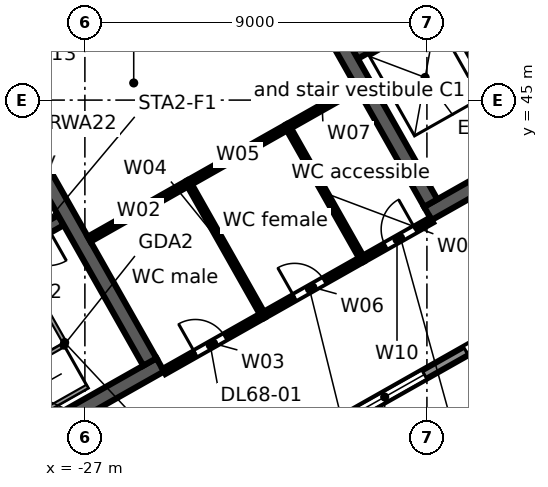
"""IFC4 building model, lengths in metres.
Left out: names, types, materials, properties, quantities, classifications, styles, units other than length and angle.
Written with IfcOpenShell. Run it as: python <this file> out.ifc"""

import sys

from ifc_helpers import new_model, si_unit, direction, frame, frame_2d, origin, place, context, subcontext, project, spatial, rectangle, extrude, element, fill, save


model = new_model("IFC4")
c1 = context("Model", 3, precision=1e-05, world=origin(), true_north=direction((0.0, 1.0)))
c2 = subcontext(c1, "Body", "Model", "MODEL_VIEW")
j1 = project(units=[si_unit("LENGTHUNIT", "METRE"), si_unit("PLANEANGLEUNIT", "RADIAN")], contexts=[c1])
p1 = place(None, origin())
s1 = spatial("IfcSite", under=j1, at=p1, CompositionType="ELEMENT")
p2 = place(p1, origin())
s2 = spatial("IfcBuilding", under=s1, at=p2, CompositionType="ELEMENT")
p3 = place(p2, frame((0.0, 0.0, 304.5)))
s3 = spatial("IfcBuildingStorey", under=s2, at=p3, CompositionType="ELEMENT", Elevation=304.5)
p4 = place(p3, frame((-58.732, 38.771, 0.0), z_axis=(0.0, 0.0, 1.0), x_axis=(0.870355615581, 0.492423702137, 0.0)))
e1 = element("IfcWall", 1, at=p4, inside=s3, PredefinedType="STANDARD", context=c2, shape_type="SweptSolid", body=[
    extrude(rectangle(XDim=64.052, YDim=0.25, at=frame_2d((32.026, 0.0))), origin(), (0.0, 0.0, 1.0), 3.52),
])
p5 = place(p4, frame((61.259, 0.0, 0.8)))
e2 = element("IfcOpeningElement", 2, at=p5, cuts=e1, PredefinedType="OPENING", context=c2, shape_type="SweptSolid", body=[
    extrude(rectangle(XDim=2.4, YDim=2.2, at=frame_2d((1.2, 1.1))), frame((0.0, 0.135, 0.0), z_axis=(0.0, -1.0, 0.0), x_axis=(1.0, 0.0, 0.0)), (0.0, 0.0, 1.0), 0.27),
])
p6 = place(p4, frame((58.216, 0.0, 0.8)))
e3 = element("IfcOpeningElement", 3, at=p6, cuts=e1, PredefinedType="OPENING", context=c2, shape_type="SweptSolid", body=[
    extrude(rectangle(XDim=2.4, YDim=2.2, at=frame_2d((1.2, 1.1))), frame((0.0, 0.135, 0.0), z_axis=(0.0, -1.0, 0.0), x_axis=(1.0, 0.0, 0.0)), (0.0, 0.0, 1.0), 0.27),
])
p7 = place(p4, frame((55.173, 0.0, 0.8)))
e4 = element("IfcOpeningElement", 4, at=p7, cuts=e1, PredefinedType="OPENING", context=c2, shape_type="SweptSolid", body=[
    extrude(rectangle(XDim=2.4, YDim=2.2, at=frame_2d((1.2, 1.1))), frame((0.0, 0.135, 0.0), z_axis=(0.0, -1.0, 0.0), x_axis=(1.0, 0.0, 0.0)), (0.0, 0.0, 1.0), 0.27),
])
p8 = place(p4, frame((52.129, 0.0, 0.8)))
e5 = element("IfcOpeningElement", 5, at=p8, cuts=e1, PredefinedType="OPENING", context=c2, shape_type="SweptSolid", body=[
    extrude(rectangle(XDim=2.4, YDim=2.2, at=frame_2d((1.2, 1.1))), frame((0.0, 0.135, 0.0), z_axis=(0.0, -1.0, 0.0), x_axis=(1.0, 0.0, 0.0)), (0.0, 0.0, 1.0), 0.27),
])
p9 = place(p4, frame((49.086, 0.0, 0.8)))
e6 = element("IfcOpeningElement", 6, at=p9, cuts=e1, PredefinedType="OPENING", context=c2, shape_type="SweptSolid", body=[
    extrude(rectangle(XDim=2.4, YDim=2.2, at=frame_2d((1.2, 1.1))), frame((0.0, 0.135, 0.0), z_axis=(0.0, -1.0, 0.0), x_axis=(1.0, 0.0, 0.0)), (0.0, 0.0, 1.0), 0.27),
])
p10 = place(p4, frame((46.043, 0.0, 0.8)))
e7 = element("IfcOpeningElement", 7, at=p10, cuts=e1, PredefinedType="OPENING", context=c2, shape_type="SweptSolid", body=[
    extrude(rectangle(XDim=2.4, YDim=2.2, at=frame_2d((1.2, 1.1))), frame((0.0, 0.135, 0.0), z_axis=(0.0, -1.0, 0.0), x_axis=(1.0, 0.0, 0.0)), (0.0, 0.0, 1.0), 0.27),
])
p11 = place(p4, frame((43.0, 0.0, 0.8)))
e8 = element("IfcOpeningElement", 8, at=p11, cuts=e1, PredefinedType="OPENING", context=c2, shape_type="SweptSolid", body=[
    extrude(rectangle(XDim=2.4, YDim=2.2, at=frame_2d((1.2, 1.1))), frame((0.0, 0.135, 0.0), z_axis=(0.0, -1.0, 0.0), x_axis=(1.0, 0.0, 0.0)), (0.0, 0.0, 1.0), 0.27),
])
p12 = place(p4, frame((39.956, 0.0, 0.8)))
e9 = element("IfcOpeningElement", 9, at=p12, cuts=e1, PredefinedType="OPENING", context=c2, shape_type="SweptSolid", body=[
    extrude(rectangle(XDim=2.4, YDim=2.2, at=frame_2d((1.2, 1.1))), frame((0.0, 0.135, 0.0), z_axis=(0.0, -1.0, 0.0), x_axis=(1.0, 0.0, 0.0)), (0.0, 0.0, 1.0), 0.27),
])
p13 = place(p4, frame((36.913, 0.0, 0.8)))
e10 = element("IfcOpeningElement", 10, at=p13, cuts=e1, PredefinedType="OPENING", context=c2, shape_type="SweptSolid", body=[
    extrude(rectangle(XDim=2.4, YDim=2.2, at=frame_2d((1.2, 1.1))), frame((0.0, 0.135, 0.0), z_axis=(0.0, -1.0, 0.0), x_axis=(1.0, 0.0, 0.0)), (0.0, 0.0, 1.0), 0.27),
])
p14 = place(p4, frame((33.87, 0.0, 0.8)))
e11 = element("IfcOpeningElement", 11, at=p14, cuts=e1, PredefinedType="OPENING", context=c2, shape_type="SweptSolid", body=[
    extrude(rectangle(XDim=2.4, YDim=2.2, at=frame_2d((1.2, 1.1))), frame((0.0, 0.135, 0.0), z_axis=(0.0, -1.0, 0.0), x_axis=(1.0, 0.0, 0.0)), (0.0, 0.0, 1.0), 0.27),
])
p15 = place(p4, frame((30.826, 0.0, 0.8)))
e12 = element("IfcOpeningElement", 12, at=p15, cuts=e1, PredefinedType="OPENING", context=c2, shape_type="SweptSolid", body=[
    extrude(rectangle(XDim=2.4, YDim=2.2, at=frame_2d((1.2, 1.1))), frame((0.0, 0.135, 0.0), z_axis=(0.0, -1.0, 0.0), x_axis=(1.0, 0.0, 0.0)), (0.0, 0.0, 1.0), 0.27),
])
p16 = place(p4, frame((27.783, 0.0, 0.8)))
e13 = element("IfcOpeningElement", 13, at=p16, cuts=e1, PredefinedType="OPENING", context=c2, shape_type="SweptSolid", body=[
    extrude(rectangle(XDim=2.4, YDim=2.2, at=frame_2d((1.2, 1.1))), frame((0.0, 0.135, 0.0), z_axis=(0.0, -1.0, 0.0), x_axis=(1.0, 0.0, 0.0)), (0.0, 0.0, 1.0), 0.27),
])
p17 = place(p4, frame((24.74, 0.0, 0.8)))
e14 = element("IfcOpeningElement", 14, at=p17, cuts=e1, PredefinedType="OPENING", context=c2, shape_type="SweptSolid", body=[
    extrude(rectangle(XDim=2.4, YDim=2.2, at=frame_2d((1.2, 1.1))), frame((0.0, 0.135, 0.0), z_axis=(0.0, -1.0, 0.0), x_axis=(1.0, 0.0, 0.0)), (0.0, 0.0, 1.0), 0.27),
])
p18 = place(p4, frame((21.696, 0.0, 0.8)))
e15 = element("IfcOpeningElement", 15, at=p18, cuts=e1, PredefinedType="OPENING", context=c2, shape_type="SweptSolid", body=[
    extrude(rectangle(XDim=2.4, YDim=2.2, at=frame_2d((1.2, 1.1))), frame((0.0, 0.135, 0.0), z_axis=(0.0, -1.0, 0.0), x_axis=(1.0, 0.0, 0.0)), (0.0, 0.0, 1.0), 0.27),
])
p19 = place(p4, frame((18.653, 0.0, 0.8)))
e16 = element("IfcOpeningElement", 16, at=p19, cuts=e1, PredefinedType="OPENING", context=c2, shape_type="SweptSolid", body=[
    extrude(rectangle(XDim=2.4, YDim=2.2, at=frame_2d((1.2, 1.1))), frame((0.0, 0.135, 0.0), z_axis=(0.0, -1.0, 0.0), x_axis=(1.0, 0.0, 0.0)), (0.0, 0.0, 1.0), 0.27),
])
p20 = place(p4, frame((15.61, 0.0, 0.8)))
e17 = element("IfcOpeningElement", 17, at=p20, cuts=e1, PredefinedType="OPENING", context=c2, shape_type="SweptSolid", body=[
    extrude(rectangle(XDim=2.4, YDim=2.2, at=frame_2d((1.2, 1.1))), frame((0.0, 0.135, 0.0), z_axis=(0.0, -1.0, 0.0), x_axis=(1.0, 0.0, 0.0)), (0.0, 0.0, 1.0), 0.27),
])
p21 = place(p4, frame((12.567, 0.0, 0.8)))
e18 = element("IfcOpeningElement", 18, at=p21, cuts=e1, PredefinedType="OPENING", context=c2, shape_type="SweptSolid", body=[
    extrude(rectangle(XDim=2.4, YDim=2.2, at=frame_2d((1.2, 1.1))), frame((0.0, 0.135, 0.0), z_axis=(0.0, -1.0, 0.0), x_axis=(1.0, 0.0, 0.0)), (0.0, 0.0, 1.0), 0.27),
])
p22 = place(p4, frame((9.523, 0.0, 0.8)))
e19 = element("IfcOpeningElement", 19, at=p22, cuts=e1, PredefinedType="OPENING", context=c2, shape_type="SweptSolid", body=[
    extrude(rectangle(XDim=2.4, YDim=2.2, at=frame_2d((1.2, 1.1))), frame((0.0, 0.135, 0.0), z_axis=(0.0, -1.0, 0.0), x_axis=(1.0, 0.0, 0.0)), (0.0, 0.0, 1.0), 0.27),
])
p23 = place(p4, frame((6.48, 0.0, 0.8)))
e20 = element("IfcOpeningElement", 20, at=p23, cuts=e1, PredefinedType="OPENING", context=c2, shape_type="SweptSolid", body=[
    extrude(rectangle(XDim=2.4, YDim=2.2, at=frame_2d((1.2, 1.1))), frame((0.0, 0.135, 0.0), z_axis=(0.0, -1.0, 0.0), x_axis=(1.0, 0.0, 0.0)), (0.0, 0.0, 1.0), 0.27),
])
p24 = place(p4, frame((3.437, 0.0, 0.8)))
e21 = element("IfcOpeningElement", 21, at=p24, cuts=e1, PredefinedType="OPENING", context=c2, shape_type="SweptSolid", body=[
    extrude(rectangle(XDim=2.4, YDim=2.2, at=frame_2d((1.2, 1.1))), frame((0.0, 0.135, 0.0), z_axis=(0.0, -1.0, 0.0), x_axis=(1.0, 0.0, 0.0)), (0.0, 0.0, 1.0), 0.27),
])
p25 = place(p4, frame((0.393, 0.0, 0.8)))
e22 = element("IfcOpeningElement", 22, at=p25, cuts=e1, PredefinedType="OPENING", context=c2, shape_type="SweptSolid", body=[
    extrude(rectangle(XDim=2.4, YDim=2.2, at=frame_2d((1.2, 1.1))), frame((0.0, 0.135, 0.0), z_axis=(0.0, -1.0, 0.0), x_axis=(1.0, 0.0, 0.0)), (0.0, 0.0, 1.0), 0.27),
])
p26 = place(p3, frame((-3.017, 46.293, 0.0), z_axis=(0.0, 0.0, 1.0), x_axis=(-0.870355474887, -0.492423950812, 0.0)))
e23 = element("IfcWall", 23, at=p26, inside=s3, PredefinedType="STANDARD", context=c2, shape_type="SweptSolid", body=[
    extrude(rectangle(XDim=40.34, YDim=0.25, at=frame_2d((20.17, 0.0))), origin(), (0.0, 0.0, 1.0), 3.52),
])
p27 = place(p26, frame((37.428, 0.0, 0.8)))
e24 = element("IfcOpeningElement", 24, at=p27, cuts=e23, PredefinedType="OPENING", context=c2, shape_type="SweptSolid", body=[
    extrude(rectangle(XDim=2.4, YDim=2.2, at=frame_2d((1.2, 1.1))), frame((0.0, 0.135, 0.0), z_axis=(0.0, -1.0, 0.0), x_axis=(1.0, 0.0, 0.0)), (0.0, 0.0, 1.0), 0.27),
])
p28 = place(p26, frame((34.372, 0.0, 0.0)))
e25 = element("IfcOpeningElement", 25, at=p28, cuts=e23, PredefinedType="OPENING", context=c2, shape_type="SweptSolid", body=[
    extrude(rectangle(XDim=1.8, YDim=2.4, at=frame_2d((0.9, 1.2))), frame((0.0, 0.135, 0.0), z_axis=(0.0, -1.0, 0.0), x_axis=(1.0, 0.0, 0.0)), (0.0, 0.0, 1.0), 0.27),
])
p29 = place(p26, frame((30.716, 0.0, 0.8)))
e26 = element("IfcOpeningElement", 26, at=p29, cuts=e23, PredefinedType="OPENING", context=c2, shape_type="SweptSolid", body=[
    extrude(rectangle(XDim=2.4, YDim=2.2, at=frame_2d((1.2, 1.1))), frame((0.0, 0.135, 0.0), z_axis=(0.0, -1.0, 0.0), x_axis=(1.0, 0.0, 0.0)), (0.0, 0.0, 1.0), 0.27),
])
p30 = place(p26, frame((27.36, 0.0, 0.8)))
e27 = element("IfcOpeningElement", 27, at=p30, cuts=e23, PredefinedType="OPENING", context=c2, shape_type="SweptSolid", body=[
    extrude(rectangle(XDim=2.4, YDim=2.2, at=frame_2d((1.2, 1.1))), frame((0.0, 0.135, 0.0), z_axis=(0.0, -1.0, 0.0), x_axis=(1.0, 0.0, 0.0)), (0.0, 0.0, 1.0), 0.27),
])
p31 = place(p26, frame((24.304, 0.0, 0.0)))
e28 = element("IfcOpeningElement", 28, at=p31, cuts=e23, PredefinedType="OPENING", context=c2, shape_type="SweptSolid", body=[
    extrude(rectangle(XDim=1.8, YDim=2.4, at=frame_2d((0.9, 1.2))), frame((0.0, 0.135, 0.0), z_axis=(0.0, -1.0, 0.0), x_axis=(1.0, 0.0, 0.0)), (0.0, 0.0, 1.0), 0.27),
])
p32 = place(p26, frame((20.648, 0.0, 0.8)))
e29 = element("IfcOpeningElement", 29, at=p32, cuts=e23, PredefinedType="OPENING", context=c2, shape_type="SweptSolid", body=[
    extrude(rectangle(XDim=2.4, YDim=2.2, at=frame_2d((1.2, 1.1))), frame((0.0, 0.135, 0.0), z_axis=(0.0, -1.0, 0.0), x_axis=(1.0, 0.0, 0.0)), (0.0, 0.0, 1.0), 0.27),
])
p33 = place(p26, frame((17.292, 0.0, 0.8)))
e30 = element("IfcOpeningElement", 30, at=p33, cuts=e23, PredefinedType="OPENING", context=c2, shape_type="SweptSolid", body=[
    extrude(rectangle(XDim=2.4, YDim=2.2, at=frame_2d((1.2, 1.1))), frame((0.0, 0.135, 0.0), z_axis=(0.0, -1.0, 0.0), x_axis=(1.0, 0.0, 0.0)), (0.0, 0.0, 1.0), 0.27),
])
p34 = place(p26, frame((14.236, 0.0, 0.0)))
e31 = element("IfcOpeningElement", 31, at=p34, cuts=e23, PredefinedType="OPENING", context=c2, shape_type="SweptSolid", body=[
    extrude(rectangle(XDim=1.8, YDim=2.4, at=frame_2d((0.9, 1.2))), frame((0.0, 0.135, 0.0), z_axis=(0.0, -1.0, 0.0), x_axis=(1.0, 0.0, 0.0)), (0.0, 0.0, 1.0), 0.27),
])
p35 = place(p26, frame((10.58, 0.0, 0.8)))
e32 = element("IfcOpeningElement", 32, at=p35, cuts=e23, PredefinedType="OPENING", context=c2, shape_type="SweptSolid", body=[
    extrude(rectangle(XDim=2.4, YDim=2.2, at=frame_2d((1.2, 1.1))), frame((0.0, 0.135, 0.0), z_axis=(0.0, -1.0, 0.0), x_axis=(1.0, 0.0, 0.0)), (0.0, 0.0, 1.0), 0.27),
])
p36 = place(p26, frame((7.224, 0.0, 0.8)))
e33 = element("IfcOpeningElement", 33, at=p36, cuts=e23, PredefinedType="OPENING", context=c2, shape_type="SweptSolid", body=[
    extrude(rectangle(XDim=2.4, YDim=2.2, at=frame_2d((1.2, 1.1))), frame((0.0, 0.135, 0.0), z_axis=(0.0, -1.0, 0.0), x_axis=(1.0, 0.0, 0.0)), (0.0, 0.0, 1.0), 0.27),
])
p37 = place(p26, frame((4.168, 0.0, 0.0)))
e34 = element("IfcOpeningElement", 34, at=p37, cuts=e23, PredefinedType="OPENING", context=c2, shape_type="SweptSolid", body=[
    extrude(rectangle(XDim=1.8, YDim=2.4, at=frame_2d((0.9, 1.2))), frame((0.0, 0.135, 0.0), z_axis=(0.0, -1.0, 0.0), x_axis=(1.0, 0.0, 0.0)), (0.0, 0.0, 1.0), 0.27),
])
p38 = place(p26, frame((0.512, 0.0, 0.8)))
e35 = element("IfcOpeningElement", 35, at=p38, cuts=e23, PredefinedType="OPENING", context=c2, shape_type="SweptSolid", body=[
    extrude(rectangle(XDim=2.4, YDim=2.2, at=frame_2d((1.2, 1.1))), frame((0.0, 0.135, 0.0), z_axis=(0.0, -1.0, 0.0), x_axis=(1.0, 0.0, 0.0)), (0.0, 0.0, 1.0), 0.27),
])
p39 = place(p3, frame((-39.813, 29.662, 0.0), z_axis=(0.0, 0.0, 1.0), x_axis=(0.870350116061, 0.492433422375, 0.0)))
e36 = element("IfcWall", 36, at=p39, inside=s3, PredefinedType="SOLIDWALL", context=c2, shape_type="SweptSolid", body=[
    extrude(rectangle(XDim=17.0, YDim=0.4, at=frame_2d((8.5, 0.0))), origin(), (0.0, 0.0, 1.0), 3.52),
])
p40 = place(p39, frame((7.2, 0.0, 0.0)))
e37 = element("IfcOpeningElement", 37, at=p40, cuts=e36, PredefinedType="OPENING", context=c2, shape_type="SweptSolid", body=[
    extrude(rectangle(XDim=1.2, YDim=2.1, at=frame_2d((0.6, 1.05))), frame((0.0, 0.21, 0.0), z_axis=(0.0, -1.0, 0.0), x_axis=(1.0, 0.0, 0.0)), (0.0, 0.0, 1.0), 0.42),
])
p41 = place(p3, frame((-34.245, 38.097, 0.0), z_axis=(0.0, 0.0, 1.0), x_axis=(0.870356351998, 0.492422400523, 0.0)))
e38 = element("IfcWall", 38, at=p41, inside=s3, PredefinedType="SOLIDWALL", context=c2, shape_type="SweptSolid", body=[
    extrude(rectangle(XDim=7.6, YDim=0.3, at=frame_2d((3.8, 0.0))), origin(), (0.0, 0.0, 1.0), 3.52),
])
p42 = place(p41, frame((6.2, 0.0, 0.0)))
e39 = element("IfcOpeningElement", 39, at=p42, cuts=e38, PredefinedType="OPENING", context=c2, shape_type="SweptSolid", body=[
    extrude(rectangle(XDim=1.0, YDim=2.1, at=frame_2d((0.5, 1.05))), frame((0.0, 0.16, 0.0), z_axis=(0.0, -1.0, 0.0), x_axis=(1.0, 0.0, 0.0)), (0.0, 0.0, 1.0), 0.32),
])
p43 = place(p3, frame((-31.79, 49.597, 0.0), z_axis=(0.0, 0.0, 1.0), x_axis=(0.492421663121, -0.870356769198, 0.0)))
e40 = element("IfcWall", 40, at=p43, inside=s3, PredefinedType="SOLIDWALL", context=c2, shape_type="SweptSolid", body=[
    extrude(rectangle(XDim=13.2, YDim=0.4, at=frame_2d((6.6, 0.0))), origin(), (0.0, 0.0, 1.0), 3.52),
])
p44 = place(p3, frame((-17.975, 42.017, 0.0), z_axis=(0.0, 0.0, 1.0), x_axis=(0.87034965173, 0.492434243055, 0.0)))
e41 = element("IfcWall", 41, at=p44, inside=s3, PredefinedType="SOLIDWALL", context=c2, shape_type="SweptSolid", body=[
    extrude(rectangle(XDim=15.0, YDim=0.4, at=frame_2d((7.5, 0.0))), origin(), (0.0, 0.0, 1.0), 3.52),
])
p45 = place(p44, frame((6.1, 0.0, 0.0)))
e42 = element("IfcOpeningElement", 42, at=p45, cuts=e41, PredefinedType="OPENING", context=c2, shape_type="SweptSolid", body=[
    extrude(rectangle(XDim=1.2, YDim=2.1, at=frame_2d((0.6, 1.05))), frame((0.0, 0.21, 0.0), z_axis=(0.0, -1.0, 0.0), x_axis=(1.0, 0.0, 0.0)), (0.0, 0.0, 1.0), 0.42),
])
p46 = place(p3, frame((-19.892, 46.218, 0.0), z_axis=(0.0, 0.0, 1.0), x_axis=(0.870341639186, 0.492448404505, 0.0)))
e43 = element("IfcWall", 43, at=p46, inside=s3, PredefinedType="SOLIDWALL", context=c2, shape_type="SweptSolid", body=[
    extrude(rectangle(XDim=5.1, YDim=0.3, at=frame_2d((2.55, 0.0))), origin(), (0.0, 0.0, 1.0), 3.52),
])
p47 = place(p46, frame((0.75, 0.0, 0.0)))
e44 = element("IfcOpeningElement", 44, at=p47, cuts=e43, PredefinedType="OPENING", context=c2, shape_type="SweptSolid", body=[
    extrude(rectangle(XDim=1.1, YDim=2.1, at=frame_2d((0.55, 1.05))), frame((0.0, 0.16, 0.0), z_axis=(0.0, -1.0, 0.0), x_axis=(1.0, 0.0, 0.0)), (0.0, 0.0, 1.0), 0.32),
])
p48 = place(p46, frame((3.35, 0.0, 0.0)))
e45 = element("IfcOpeningElement", 45, at=p48, cuts=e43, PredefinedType="OPENING", context=c2, shape_type="SweptSolid", body=[
    extrude(rectangle(XDim=1.1, YDim=2.1, at=frame_2d((0.55, 1.05))), frame((0.0, 0.16, 0.0), z_axis=(0.0, -1.0, 0.0), x_axis=(1.0, 0.0, 0.0)), (0.0, 0.0, 1.0), 0.32),
])
p49 = place(p3, frame((-24.4, 53.779, 0.0), z_axis=(0.0, 0.0, 1.0), x_axis=(0.492421663121, -0.870356769198, 0.0)))
e46 = element("IfcWall", 46, at=p49, inside=s3, PredefinedType="SOLIDWALL", context=c2, shape_type="SweptSolid", body=[
    extrude(rectangle(XDim=13.2, YDim=0.4, at=frame_2d((6.6, 0.0))), origin(), (0.0, 0.0, 1.0), 3.52),
])
p50 = place(p3, frame((-17.469, 47.417, 0.0), z_axis=(0.0, 0.0, 1.0), x_axis=(0.492466057713, -0.870331650579, 0.0)))
e47 = element("IfcWall", 47, at=p50, inside=s3, PredefinedType="SOLIDWALL", context=c2, shape_type="SweptSolid", body=[
    extrude(rectangle(XDim=4.25, YDim=0.2, at=frame_2d((2.125, 0.0))), origin(), (0.0, 0.0, 1.0), 3.52),
])
p51 = place(p3, frame((-26.888, 41.34, 0.0), z_axis=(0.0, 0.0, 1.0), x_axis=(0.8702292093, 0.492647057518, 0.0)))
e48 = element("IfcWall", 48, at=p51, inside=s3, PredefinedType="PARTITIONING", context=c2, shape_type="SweptSolid", body=[
    extrude(rectangle(XDim=3.0, YDim=0.15, at=frame_2d((1.5, 0.0))), origin(), (0.0, 0.0, 1.0), 2.792),
])
p52 = place(p3, frame((-24.919, 37.859, 0.0), z_axis=(0.0, 0.0, 1.0), x_axis=(0.870368744559, 0.492400496034, 0.0)))
e49 = element("IfcWall", 49, at=p52, inside=s3, PredefinedType="PARTITIONING", context=c2, shape_type="SweptSolid", body=[
    extrude(rectangle(XDim=3.0, YDim=0.15, at=frame_2d((1.5, 0.0))), origin(), (0.0, 0.0, 1.0), 2.792),
])
p53 = place(p52, frame((0.95, 0.0, 0.0)))
e50 = element("IfcOpeningElement", 50, at=p53, cuts=e49, PredefinedType="OPENING", context=c2, shape_type="SweptSolid", body=[
    extrude(rectangle(XDim=0.9, YDim=2.1, at=frame_2d((0.45, 1.05))), frame((0.0, 0.085, 0.0), z_axis=(0.0, -1.0, 0.0), x_axis=(1.0, 0.0, 0.0)), (0.0, 0.0, 1.0), 0.17),
])
p54 = place(p3, frame((-24.277, 42.818, 0.0), z_axis=(0.0, 0.0, 1.0), x_axis=(0.492210087366, -0.870476438449, 0.0)))
e51 = element("IfcWall", 51, at=p54, inside=s3, PredefinedType="PARTITIONING", context=c2, shape_type="SweptSolid", body=[
    extrude(rectangle(XDim=4.0, YDim=0.125, at=frame_2d((2.0, 0.0))), origin(), (0.0, 0.0, 1.0), 3.52),
])
p55 = place(p3, frame((-24.277, 42.818, 0.0), z_axis=(0.0, 0.0, 1.0), x_axis=(0.870423351516, 0.492303960105, 0.0)))
e52 = element("IfcWall", 52, at=p55, inside=s3, PredefinedType="PARTITIONING", context=c2, shape_type="SweptSolid", body=[
    extrude(rectangle(XDim=3.0, YDim=0.15, at=frame_2d((1.5, 0.0))), origin(), (0.0, 0.0, 1.0), 3.52),
])
p56 = place(p3, frame((-22.308, 39.336, 0.0), z_axis=(0.0, 0.0, 1.0), x_axis=(0.870248957119, 0.492612172641, 0.0)))
e53 = element("IfcWall", 53, at=p56, inside=s3, PredefinedType="PARTITIONING", context=c2, shape_type="SweptSolid", body=[
    extrude(rectangle(XDim=3.0, YDim=0.15, at=frame_2d((1.5, 0.0))), origin(), (0.0, 0.0, 1.0), 3.52),
])
p57 = place(p56, frame((0.95, 0.0, 0.0)))
e54 = element("IfcOpeningElement", 54, at=p57, cuts=e53, PredefinedType="OPENING", context=c2, shape_type="SweptSolid", body=[
    extrude(rectangle(XDim=0.9, YDim=2.1, at=frame_2d((0.45, 1.05))), frame((0.0, 0.085, 0.0), z_axis=(0.0, -1.0, 0.0), x_axis=(1.0, 0.0, 0.0)), (0.0, 0.0, 1.0), 0.17),
])
p58 = place(p3, frame((-21.666, 44.295, 0.0), z_axis=(0.0, 0.0, 1.0), x_axis=(0.870297454631, 0.492526487067, 0.0)))
e55 = element("IfcWall", 55, at=p58, inside=s3, PredefinedType="PARTITIONING", context=c2, shape_type="SweptSolid", body=[
    extrude(rectangle(XDim=2.091, YDim=0.15, at=frame_2d((1.046, 0.0))), origin(), (0.0, 0.0, 1.0), 3.52),
])
p59 = place(p3, frame((-21.666, 44.295, 0.0), z_axis=(0.0, 0.0, 1.0), x_axis=(0.492340861121, -0.870402479587, 0.0)))
e56 = element("IfcWall", 56, at=p59, inside=s3, PredefinedType="PARTITIONING", context=c2, shape_type="SweptSolid", body=[
    extrude(rectangle(XDim=3.999, YDim=0.125, at=frame_2d((2.0, 0.0))), origin(), (0.0, 0.0, 1.0), 3.52),
])
p60 = place(p3, frame((-19.697, 40.814, 0.0), z_axis=(0.0, 0.0, 1.0), x_axis=(0.870497588791, 0.492172680986, 0.0)))
e57 = element("IfcWall", 57, at=p60, inside=s3, PredefinedType="PARTITIONING", context=c2, shape_type="SweptSolid", body=[
    extrude(rectangle(XDim=2.091, YDim=0.15, at=frame_2d((1.045, 0.0))), origin(), (0.0, 0.0, 1.0), 3.52),
])
p61 = place(p60, frame((0.7, 0.0, 0.0)))
e58 = element("IfcOpeningElement", 58, at=p61, cuts=e57, PredefinedType="OPENING", context=c2, shape_type="SweptSolid", body=[
    extrude(rectangle(XDim=0.9, YDim=2.1, at=frame_2d((0.45, 1.05))), frame((0.0, 0.085, 0.0), z_axis=(0.0, -1.0, 0.0), x_axis=(1.0, 0.0, 0.0)), (0.0, 0.0, 1.0), 0.17),
])
p62 = place(p33, origin())
e59 = element("IfcWindow", 59, at=p62, inside=s3, PartitioningType="SINGLE_PANEL", PredefinedType="WINDOW", context=c2, shape_type="SweptSolid", body=[
    extrude(rectangle(XDim=2.4, YDim=2.2, at=frame_2d((1.2, 1.1))), frame((0.0, 0.03, 0.0), z_axis=(0.0, -1.0, 0.0), x_axis=(1.0, 0.0, 0.0)), (0.0, 0.0, 1.0), 0.06),
])
fill(e30, e59)
p63 = place(p34, origin())
e60 = element("IfcDoor", 60, at=p63, inside=s3, OperationType="DOUBLE_DOOR_SINGLE_SWING", PredefinedType="DOOR", context=c2, shape_type="SweptSolid", body=[
    extrude(rectangle(XDim=1.8, YDim=2.4, at=frame_2d((0.9, 1.2))), frame((0.0, 0.025, 0.0), z_axis=(0.0, -1.0, 0.0), x_axis=(1.0, 0.0, 0.0)), (0.0, 0.0, 1.0), 0.05),
])
fill(e31, e60)
p64 = place(p53, origin())
e61 = element("IfcDoor", 61, at=p64, inside=s3, OperationType="SINGLE_SWING_LEFT", PredefinedType="DOOR", context=c2, shape_type="SweptSolid", body=[
    extrude(rectangle(XDim=0.9, YDim=2.1, at=frame_2d((0.45, 1.05))), frame((0.0, 0.025, 0.0), z_axis=(0.0, -1.0, 0.0), x_axis=(1.0, 0.0, 0.0)), (0.0, 0.0, 1.0), 0.05),
])
fill(e50, e61)
p65 = place(p57, origin())
e62 = element("IfcDoor", 62, at=p65, inside=s3, OperationType="SINGLE_SWING_LEFT", PredefinedType="DOOR", context=c2, shape_type="SweptSolid", body=[
    extrude(rectangle(XDim=0.9, YDim=2.1, at=frame_2d((0.45, 1.05))), frame((0.0, 0.025, 0.0), z_axis=(0.0, -1.0, 0.0), x_axis=(1.0, 0.0, 0.0)), (0.0, 0.0, 1.0), 0.05),
])
fill(e54, e62)
p66 = place(p61, origin())
e63 = element("IfcDoor", 63, at=p66, inside=s3, OperationType="SINGLE_SWING_RIGHT", PredefinedType="DOOR", context=c2, shape_type="SweptSolid", body=[
    extrude(rectangle(XDim=0.9, YDim=2.1, at=frame_2d((0.45, 1.05))), frame((0.0, 0.025, 0.0), z_axis=(0.0, -1.0, 0.0), x_axis=(1.0, 0.0, 0.0)), (0.0, 0.0, 1.0), 0.05),
])
fill(e58, e63)
save(model, sys.argv[1])
